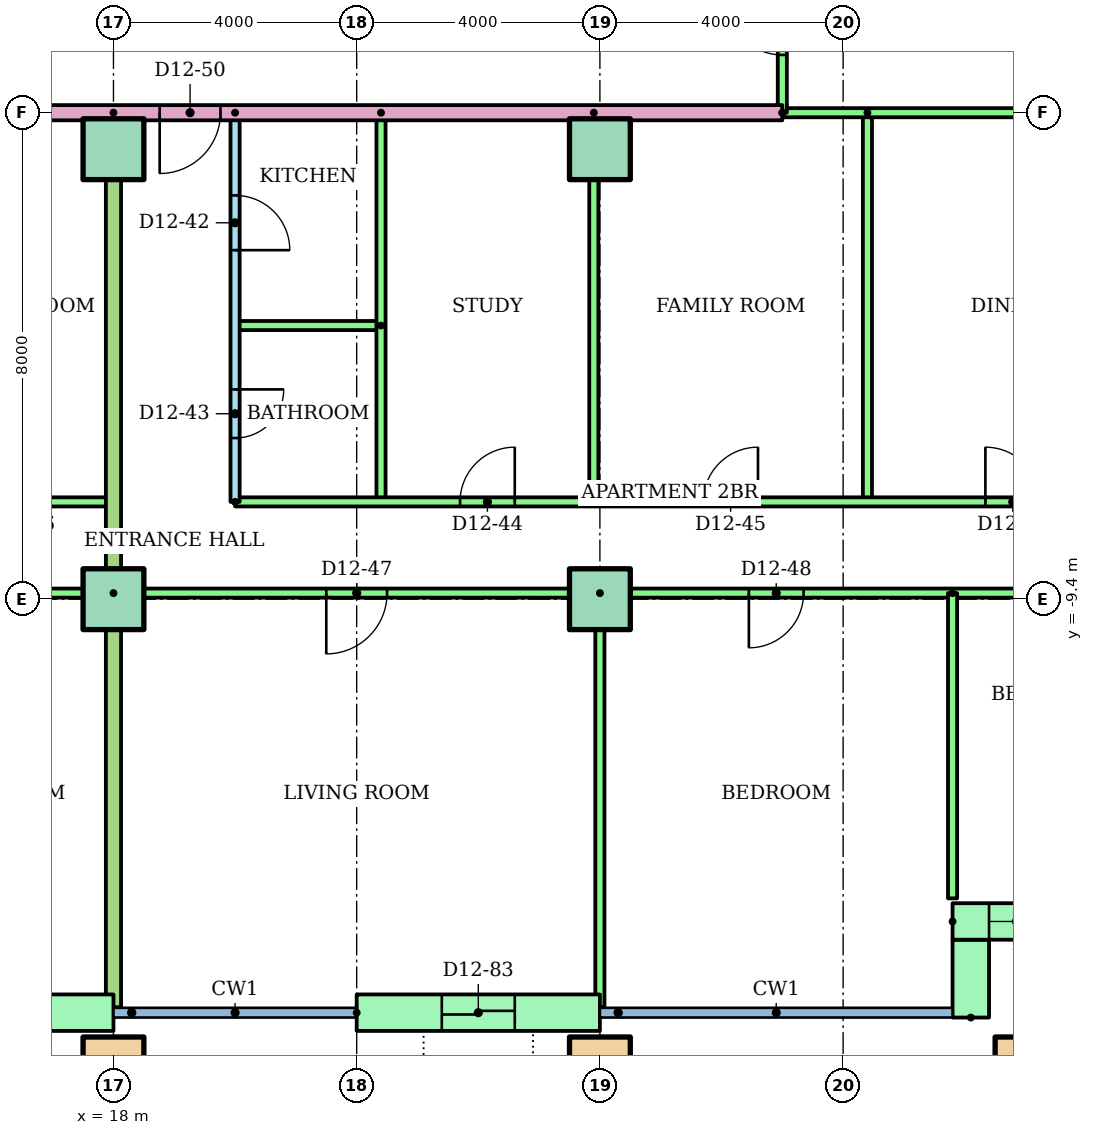
"""IFC4 building model, lengths in metres.
Left out: names, types, materials, properties, quantities, classifications, styles, units other than length and angle.
Written with IfcOpenShell. Run it as: python <this file> out.ifc"""

import sys

from ifc_helpers import new_model, si_unit, direction, frame, frame_2d, origin, origin_2d, place, context, subcontext, project, spatial, rectangle, hollow_rectangle, extrude, element, fill, save


model = new_model("IFC4")
c1 = context("Model", 3, precision=1e-05, world=origin(), true_north=direction((0.0, 1.0)))
c2 = subcontext(c1, "Body", "Model", "MODEL_VIEW")
j1 = project(units=[si_unit("LENGTHUNIT", "METRE"), si_unit("PLANEANGLEUNIT", "RADIAN")], contexts=[c1])
p1 = place(None, origin())
s1 = spatial("IfcSite", under=j1, at=p1, CompositionType="ELEMENT")
p2 = place(p1, origin())
s2 = spatial("IfcBuilding", under=s1, at=p2, CompositionType="ELEMENT")
p3 = place(p2, frame((0.0, 0.0, 48.0)))
s3 = spatial("IfcBuildingStorey", under=s2, at=p3, CompositionType="ELEMENT", Elevation=48.0)
for number, where in (
    (1, (18.0, -17.1, 0.0)),
    (2, (26.0, -17.1, 0.0)),
    (3, (33.0, -17.1, 0.0)),
):
    element("IfcColumn", number, at=place(p3, frame(where)), inside=s3, PredefinedType="COLUMN", context=c2, shape_type="SweptSolid", body=[
        extrude(hollow_rectangle(XDim=1.0, YDim=1.0, WallThickness=0.05, at=origin_2d()), origin(), (0.0, 0.0, 1.0), 3.2),
    ])
for number, where in (
    (4, (18.0, -9.4, 0.0)),
    (5, (26.0, -9.4, 0.0)),
    (6, (18.0, -2.0, 0.0)),
    (7, (26.0, -2.0, 0.0)),
):
    element("IfcColumn", number, at=place(p3, frame(where)), inside=s3, PredefinedType="COLUMN", context=c2, shape_type="SweptSolid", body=[
        extrude(rectangle(XDim=1.0, YDim=1.0, at=origin_2d()), origin(), (0.0, 0.0, 1.0), 3.2),
    ])
p4 = place(p3, frame((14.0, -16.2, 0.0)))
e8 = element("IfcWall", 8, at=p4, inside=s3, PredefinedType="STANDARD", context=c2, shape_type="SweptSolid", body=[
    extrude(rectangle(XDim=4.0, YDim=0.6, at=frame_2d((2.0, 0.0))), origin(), (0.0, 0.0, 1.0), 2.92),
])
p5 = place(p4, frame((1.4, 0.0, 0.0)))
e9 = element("IfcOpeningElement", 9, at=p5, cuts=e8, PredefinedType="OPENING", context=c2, shape_type="SweptSolid", body=[
    extrude(rectangle(XDim=1.2, YDim=2.1, at=frame_2d((0.6, 1.05))), frame((0.0, 0.31, 0.0), z_axis=(0.0, -1.0, 0.0), x_axis=(1.0, 0.0, 0.0)), (0.0, 0.0, 1.0), 0.62),
])
p6 = place(p3, frame((22.0, -16.2, 0.0)))
e10 = element("IfcWall", 10, at=p6, inside=s3, PredefinedType="STANDARD", context=c2, shape_type="SweptSolid", body=[
    extrude(rectangle(XDim=4.0, YDim=0.6, at=frame_2d((2.0, 0.0))), origin(), (0.0, 0.0, 1.0), 2.92),
])
p7 = place(p6, frame((1.4, 0.0, 0.0)))
e11 = element("IfcOpeningElement", 11, at=p7, cuts=e10, PredefinedType="OPENING", context=c2, shape_type="SweptSolid", body=[
    extrude(rectangle(XDim=1.2, YDim=2.1, at=frame_2d((0.6, 1.05))), frame((0.0, 0.31, 0.0), z_axis=(0.0, -1.0, 0.0), x_axis=(1.0, 0.0, 0.0)), (0.0, 0.0, 1.0), 0.62),
])
p8 = place(p3, frame((32.1, -16.28, 0.0), z_axis=(0.0, 0.0, 1.0), x_axis=(0.0, 1.0, 0.0)))
e12 = element("IfcWall", 12, at=p8, inside=s3, PredefinedType="STANDARD", context=c2, shape_type="SweptSolid", body=[
    extrude(rectangle(XDim=1.28, YDim=0.6, at=frame_2d((0.64, 0.0))), origin(), (0.0, 0.0, 1.0), 2.92),
])
p9 = place(p3, frame((31.8, -14.7, 0.0)))
e13 = element("IfcWall", 13, at=p9, inside=s3, PredefinedType="STANDARD", context=c2, shape_type="SweptSolid", body=[
    extrude(rectangle(XDim=2.1, YDim=0.6, at=frame_2d((1.05, 0.0))), origin(), (0.0, 0.0, 1.0), 2.92),
])
p10 = place(p9, frame((0.6, 0.0, 0.9)))
e14 = element("IfcOpeningElement", 14, at=p10, cuts=e13, PredefinedType="OPENING", context=c2, shape_type="SweptSolid", body=[
    extrude(rectangle(XDim=0.9, YDim=1.5, at=frame_2d((0.45, 0.75))), frame((0.0, 0.31, 0.0), z_axis=(0.0, -1.0, 0.0), x_axis=(1.0, 0.0, 0.0)), (0.0, 0.0, 1.0), 0.62),
])
p11 = place(p3, frame((4.0, -7.8, 0.0)))
e15 = element("IfcWall", 15, at=p11, inside=s3, PredefinedType="PARTITIONING", context=c2, shape_type="SweptSolid", body=[
    extrude(rectangle(XDim=14.0, YDim=0.15, at=frame_2d((7.0, 0.0))), origin(), (0.0, 0.0, 1.0), 2.4),
])
p12 = place(p11, frame((4.325, 0.0, 0.0)))
e16 = element("IfcOpeningElement", 16, at=p12, cuts=e15, PredefinedType="OPENING", context=c2, shape_type="SweptSolid", body=[
    extrude(rectangle(XDim=0.9, YDim=2.1, at=frame_2d((0.45, 1.05))), frame((0.0, 0.085, 0.0), z_axis=(0.0, -1.0, 0.0), x_axis=(1.0, 0.0, 0.0)), (0.0, 0.0, 1.0), 0.17),
])
p13 = place(p11, frame((8.575, 0.0, 0.0)))
e17 = element("IfcOpeningElement", 17, at=p13, cuts=e15, PredefinedType="OPENING", context=c2, shape_type="SweptSolid", body=[
    extrude(rectangle(XDim=0.9, YDim=2.1, at=frame_2d((0.45, 1.05))), frame((0.0, 0.085, 0.0), z_axis=(0.0, -1.0, 0.0), x_axis=(1.0, 0.0, 0.0)), (0.0, 0.0, 1.0), 0.17),
])
p14 = place(p11, frame((12.0, 0.0, 0.0)))
e18 = element("IfcOpeningElement", 18, at=p14, cuts=e15, PredefinedType="OPENING", context=c2, shape_type="SweptSolid", body=[
    extrude(rectangle(XDim=0.9, YDim=2.1, at=frame_2d((0.45, 1.05))), frame((0.0, 0.085, 0.0), z_axis=(0.0, -1.0, 0.0), x_axis=(1.0, 0.0, 0.0)), (0.0, 0.0, 1.0), 0.17),
])
p15 = place(p3, frame((18.0, -9.3, 0.0), z_axis=(0.0, 0.0, 1.0), x_axis=(-1.0, 0.0, 0.0)))
e19 = element("IfcWall", 19, at=p15, inside=s3, PredefinedType="PARTITIONING", context=c2, shape_type="SweptSolid", body=[
    extrude(rectangle(XDim=16.0, YDim=0.15, at=frame_2d((8.0, 0.0))), origin(), (0.0, 0.0, 1.0), 2.4),
])
p16 = place(p15, frame((13.55, 0.0, 0.0)))
e20 = element("IfcOpeningElement", 20, at=p16, cuts=e19, PredefinedType="OPENING", context=c2, shape_type="SweptSolid", body=[
    extrude(rectangle(XDim=0.9, YDim=2.1, at=frame_2d((0.45, 1.05))), frame((0.0, 0.085, 0.0), z_axis=(0.0, -1.0, 0.0), x_axis=(1.0, 0.0, 0.0)), (0.0, 0.0, 1.0), 0.17),
])
p17 = place(p15, frame((9.55, 0.0, 0.0)))
e21 = element("IfcOpeningElement", 21, at=p17, cuts=e19, PredefinedType="OPENING", context=c2, shape_type="SweptSolid", body=[
    extrude(rectangle(XDim=0.9, YDim=2.1, at=frame_2d((0.45, 1.05))), frame((0.0, 0.085, 0.0), z_axis=(0.0, -1.0, 0.0), x_axis=(1.0, 0.0, 0.0)), (0.0, 0.0, 1.0), 0.17),
])
p18 = place(p15, frame((5.55, 0.0, 0.0)))
e22 = element("IfcOpeningElement", 22, at=p18, cuts=e19, PredefinedType="OPENING", context=c2, shape_type="SweptSolid", body=[
    extrude(rectangle(XDim=0.9, YDim=2.1, at=frame_2d((0.45, 1.05))), frame((0.0, 0.085, 0.0), z_axis=(0.0, -1.0, 0.0), x_axis=(1.0, 0.0, 0.0)), (0.0, 0.0, 1.0), 0.17),
])
p19 = place(p15, frame((1.5, 0.0, 0.0)))
e23 = element("IfcOpeningElement", 23, at=p19, cuts=e19, PredefinedType="OPENING", context=c2, shape_type="SweptSolid", body=[
    extrude(rectangle(XDim=1.0, YDim=2.1, at=frame_2d((0.5, 1.05))), frame((0.0, 0.085, 0.0), z_axis=(0.0, -1.0, 0.0), x_axis=(1.0, 0.0, 0.0)), (0.0, 0.0, 1.0), 0.17),
])
p20 = place(p3, frame((20.0, -1.4, 0.0), z_axis=(0.0, 0.0, 1.0), x_axis=(0.0, -1.0, 0.0)))
e24 = element("IfcWall", 24, at=p20, inside=s3, PredefinedType="PARTITIONING", context=c2, shape_type="SweptSolid", body=[
    extrude(rectangle(XDim=6.4, YDim=0.15, at=frame_2d((3.2, 0.0))), origin(), (0.0, 0.0, 1.0), 2.4),
])
p21 = place(p20, frame((1.36, 0.0, 0.0)))
e25 = element("IfcOpeningElement", 25, at=p21, cuts=e24, PredefinedType="OPENING", context=c2, shape_type="SweptSolid", body=[
    extrude(rectangle(XDim=0.9, YDim=2.1, at=frame_2d((0.45, 1.05))), frame((0.0, 0.085, 0.0), z_axis=(0.0, -1.0, 0.0), x_axis=(1.0, 0.0, 0.0)), (0.0, 0.0, 1.0), 0.17),
])
p22 = place(p20, frame((4.55, 0.0, 0.0)))
e26 = element("IfcOpeningElement", 26, at=p22, cuts=e24, PredefinedType="OPENING", context=c2, shape_type="SweptSolid", body=[
    extrude(rectangle(XDim=0.8, YDim=2.1, at=frame_2d((0.4, 1.05))), frame((0.0, 0.085, 0.0), z_axis=(0.0, -1.0, 0.0), x_axis=(1.0, 0.0, 0.0)), (0.0, 0.0, 1.0), 0.17),
])
p23 = place(p3, frame((22.4, -4.9, 0.0), z_axis=(0.0, 0.0, 1.0), x_axis=(-1.0, 0.0, 0.0)))
e27 = element("IfcWall", 27, at=p23, inside=s3, PredefinedType="PARTITIONING", context=c2, shape_type="SweptSolid", body=[
    extrude(rectangle(XDim=2.4, YDim=0.15, at=frame_2d((1.2, 0.0))), origin(), (0.0, 0.0, 1.0), 2.4),
])
for number, where, z_axis, x_axis in (
    (28, (22.4, -1.4, 0.0), (0.0, 0.0, 1.0), (0.0, -1.0, 0.0)),
    (29, (25.9, -1.4, 0.0), (0.0, 0.0, 1.0), (0.0, -1.0, 0.0)),
    (30, (30.4, -1.4, 0.0), (0.0, 0.0, 1.0), (0.0, -1.0, 0.0)),
):
    element("IfcWall", number, at=place(p3, frame(where, z_axis=z_axis, x_axis=x_axis)), inside=s3, PredefinedType="PARTITIONING", context=c2, shape_type="SweptSolid", body=[
        extrude(rectangle(XDim=6.4, YDim=0.15, at=frame_2d((3.2, 0.0))), origin(), (0.0, 0.0, 1.0), 2.4),
    ])
p24 = place(p3, frame((20.0, -7.8, 0.0)))
e31 = element("IfcWall", 31, at=p24, inside=s3, PredefinedType="PARTITIONING", context=c2, shape_type="SweptSolid", body=[
    extrude(rectangle(XDim=16.52, YDim=0.15, at=frame_2d((8.26, 0.0))), origin(), (0.0, 0.0, 1.0), 2.4),
])
p25 = place(p24, frame((3.7, 0.0, 0.0)))
e32 = element("IfcOpeningElement", 32, at=p25, cuts=e31, PredefinedType="OPENING", context=c2, shape_type="SweptSolid", body=[
    extrude(rectangle(XDim=0.9, YDim=2.1, at=frame_2d((0.45, 1.05))), frame((0.0, 0.085, 0.0), z_axis=(0.0, -1.0, 0.0), x_axis=(1.0, 0.0, 0.0)), (0.0, 0.0, 1.0), 0.17),
])
p26 = place(p24, frame((7.7, 0.0, 0.0)))
e33 = element("IfcOpeningElement", 33, at=p26, cuts=e31, PredefinedType="OPENING", context=c2, shape_type="SweptSolid", body=[
    extrude(rectangle(XDim=0.9, YDim=2.1, at=frame_2d((0.45, 1.05))), frame((0.0, 0.085, 0.0), z_axis=(0.0, -1.0, 0.0), x_axis=(1.0, 0.0, 0.0)), (0.0, 0.0, 1.0), 0.17),
])
p27 = place(p24, frame((12.34, 0.0, 0.0)))
e34 = element("IfcOpeningElement", 34, at=p27, cuts=e31, PredefinedType="OPENING", context=c2, shape_type="SweptSolid", body=[
    extrude(rectangle(XDim=0.9, YDim=2.1, at=frame_2d((0.45, 1.05))), frame((0.0, 0.085, 0.0), z_axis=(0.0, -1.0, 0.0), x_axis=(1.0, 0.0, 0.0)), (0.0, 0.0, 1.0), 0.17),
])
p28 = place(p3, frame((36.52, -9.3, 0.0), z_axis=(0.0, 0.0, 1.0), x_axis=(-1.0, 0.0, 0.0)))
e35 = element("IfcWall", 35, at=p28, inside=s3, PredefinedType="PARTITIONING", context=c2, shape_type="SweptSolid", body=[
    extrude(rectangle(XDim=18.52, YDim=0.15, at=frame_2d((9.26, 0.0))), origin(), (0.0, 0.0, 1.0), 2.4),
])
p29 = place(p28, frame((14.02, 0.0, 0.0)))
e36 = element("IfcOpeningElement", 36, at=p29, cuts=e35, PredefinedType="OPENING", context=c2, shape_type="SweptSolid", body=[
    extrude(rectangle(XDim=1.0, YDim=2.1, at=frame_2d((0.5, 1.05))), frame((0.0, 0.085, 0.0), z_axis=(0.0, -1.0, 0.0), x_axis=(1.0, 0.0, 0.0)), (0.0, 0.0, 1.0), 0.17),
])
p30 = place(p28, frame((7.17, 0.0, 0.0)))
e37 = element("IfcOpeningElement", 37, at=p30, cuts=e35, PredefinedType="OPENING", context=c2, shape_type="SweptSolid", body=[
    extrude(rectangle(XDim=0.9, YDim=2.1, at=frame_2d((0.45, 1.05))), frame((0.0, 0.085, 0.0), z_axis=(0.0, -1.0, 0.0), x_axis=(1.0, 0.0, 0.0)), (0.0, 0.0, 1.0), 0.17),
])
p31 = place(p28, frame((0.86, 0.0, 0.0)))
e38 = element("IfcOpeningElement", 38, at=p31, cuts=e35, PredefinedType="OPENING", context=c2, shape_type="SweptSolid", body=[
    extrude(rectangle(XDim=0.9, YDim=2.1, at=frame_2d((0.45, 1.05))), frame((0.0, 0.085, 0.0), z_axis=(0.0, -1.0, 0.0), x_axis=(1.0, 0.0, 0.0)), (0.0, 0.0, 1.0), 0.17),
])
p32 = place(p3, frame((26.0, -9.3, 0.0), z_axis=(0.0, 0.0, 1.0), x_axis=(0.0, -1.0, 0.0)))
e39 = element("IfcWall", 39, at=p32, inside=s3, PredefinedType="PARTITIONING", context=c2, shape_type="SweptSolid", body=[
    extrude(rectangle(XDim=6.81, YDim=0.15, at=frame_2d((3.405, 0.0))), origin(), (0.0, 0.0, 1.0), 2.4),
])
p33 = place(p3, frame((31.8, -9.3, 0.0), z_axis=(0.0, 0.0, 1.0), x_axis=(0.0, -1.0, 0.0)))
e40 = element("IfcWall", 40, at=p33, inside=s3, PredefinedType="PARTITIONING", context=c2, shape_type="SweptSolid", body=[
    extrude(rectangle(XDim=5.02, YDim=0.15, at=frame_2d((2.51, 0.0))), origin(), (0.0, 0.0, 1.0), 2.4),
])
p34 = place(p3, frame((18.0, -1.4, 0.0), z_axis=(0.0, 0.0, 1.0), x_axis=(0.0, -1.0, 0.0)))
e41 = element("IfcWall", 41, at=p34, inside=s3, PredefinedType="PARTITIONING", context=c2, shape_type="SweptSolid", body=[
    extrude(rectangle(XDim=14.71, YDim=0.25, at=frame_2d((7.355, 0.0))), origin(), (0.0, 0.0, 1.0), 2.4),
])
p35 = place(p3, frame((29.0, -1.4, 0.0), z_axis=(0.0, 0.0, 1.0), x_axis=(-1.0, 0.0, 0.0)))
e42 = element("IfcWall", 42, at=p35, inside=s3, PredefinedType="PARTITIONING", context=c2, shape_type="SweptSolid", body=[
    extrude(rectangle(XDim=15.0, YDim=0.25, at=frame_2d((7.5, 0.0))), origin(), (0.0, 0.0, 1.0), 2.4),
])
p36 = place(p35, frame((9.24, 0.0, 0.0)))
e43 = element("IfcOpeningElement", 43, at=p36, cuts=e42, PredefinedType="OPENING", context=c2, shape_type="SweptSolid", body=[
    extrude(rectangle(XDim=1.0, YDim=2.1, at=frame_2d((0.5, 1.05))), frame((0.0, 0.135, 0.0), z_axis=(0.0, -1.0, 0.0), x_axis=(1.0, 0.0, 0.0)), (0.0, 0.0, 1.0), 0.27),
])
p37 = place(p3, frame((36.52, -1.4, 0.0), z_axis=(0.0, 0.0, 1.0), x_axis=(-1.0, 0.0, 0.0)))
e44 = element("IfcWall", 44, at=p37, inside=s3, PredefinedType="PARTITIONING", context=c2, shape_type="SweptSolid", body=[
    extrude(rectangle(XDim=7.52, YDim=0.15, at=frame_2d((3.76, 0.0))), origin(), (0.0, 0.0, 1.0), 2.4),
])
p38 = place(p3, frame((29.0, -1.4, 0.0), z_axis=(0.0, 0.0, 1.0), x_axis=(0.0, 1.0, 0.0)))
e45 = element("IfcWall", 45, at=p38, inside=s3, PredefinedType="PARTITIONING", context=c2, shape_type="SweptSolid", body=[
    extrude(rectangle(XDim=2.8, YDim=0.15, at=frame_2d((1.4, 0.0))), origin(), (0.0, 0.0, 1.0), 2.4),
])
p39 = place(p38, frame((0.95, 0.0, 0.0)))
e46 = element("IfcOpeningElement", 46, at=p39, cuts=e45, PredefinedType="OPENING", context=c2, shape_type="SweptSolid", body=[
    extrude(rectangle(XDim=0.9, YDim=2.1, at=frame_2d((0.45, 1.05))), frame((0.0, 0.085, 0.0), z_axis=(0.0, -1.0, 0.0), x_axis=(1.0, 0.0, 0.0)), (0.0, 0.0, 1.0), 0.17),
])
p40 = place(p10, origin())
e47 = element("IfcWindow", 47, at=p40, inside=s3, PartitioningType="SINGLE_PANEL", PredefinedType="WINDOW", context=c2, shape_type="SweptSolid", body=[
    extrude(rectangle(XDim=0.9, YDim=1.5, at=frame_2d((0.45, 0.75))), frame((0.0, 0.03, 0.0), z_axis=(0.0, -1.0, 0.0), x_axis=(1.0, 0.0, 0.0)), (0.0, 0.0, 1.0), 0.06),
])
fill(e14, e47)
p41 = place(p21, origin())
e48 = element("IfcDoor", 48, at=p41, inside=s3, OperationType="SINGLE_SWING_RIGHT", PredefinedType="DOOR", context=c2, shape_type="SweptSolid", body=[
    extrude(rectangle(XDim=0.9, YDim=2.1, at=frame_2d((0.45, 1.05))), frame((0.0, 0.025, 0.0), z_axis=(0.0, -1.0, 0.0), x_axis=(1.0, 0.0, 0.0)), (0.0, 0.0, 1.0), 0.05),
])
fill(e25, e48)
p42 = place(p22, origin())
e49 = element("IfcDoor", 49, at=p42, inside=s3, OperationType="SINGLE_SWING_LEFT", PredefinedType="DOOR", context=c2, shape_type="SweptSolid", body=[
    extrude(rectangle(XDim=0.8, YDim=2.1, at=frame_2d((0.4, 1.05))), frame((0.0, 0.025, 0.0), z_axis=(0.0, -1.0, 0.0), x_axis=(1.0, 0.0, 0.0)), (0.0, 0.0, 1.0), 0.05),
])
fill(e26, e49)
p43 = place(p25, origin())
e50 = element("IfcDoor", 50, at=p43, inside=s3, OperationType="SINGLE_SWING_RIGHT", PredefinedType="DOOR", context=c2, shape_type="SweptSolid", body=[
    extrude(rectangle(XDim=0.9, YDim=2.1, at=frame_2d((0.45, 1.05))), frame((0.0, 0.025, 0.0), z_axis=(0.0, -1.0, 0.0), x_axis=(1.0, 0.0, 0.0)), (0.0, 0.0, 1.0), 0.05),
])
fill(e32, e50)
p44 = place(p26, origin())
e51 = element("IfcDoor", 51, at=p44, inside=s3, OperationType="SINGLE_SWING_RIGHT", PredefinedType="DOOR", context=c2, shape_type="SweptSolid", body=[
    extrude(rectangle(XDim=0.9, YDim=2.1, at=frame_2d((0.45, 1.05))), frame((0.0, 0.025, 0.0), z_axis=(0.0, -1.0, 0.0), x_axis=(1.0, 0.0, 0.0)), (0.0, 0.0, 1.0), 0.05),
])
fill(e33, e51)
p45 = place(p27, origin())
e52 = element("IfcDoor", 52, at=p45, inside=s3, OperationType="SINGLE_SWING_LEFT", PredefinedType="DOOR", context=c2, shape_type="SweptSolid", body=[
    extrude(rectangle(XDim=0.9, YDim=2.1, at=frame_2d((0.45, 1.05))), frame((0.0, 0.025, 0.0), z_axis=(0.0, -1.0, 0.0), x_axis=(1.0, 0.0, 0.0)), (0.0, 0.0, 1.0), 0.05),
])
fill(e34, e52)
p46 = place(p29, origin())
e53 = element("IfcDoor", 53, at=p46, inside=s3, OperationType="SINGLE_SWING_RIGHT", PredefinedType="DOOR", context=c2, shape_type="SweptSolid", body=[
    extrude(rectangle(XDim=1.0, YDim=2.1, at=frame_2d((0.5, 1.05))), frame((0.0, 0.025, 0.0), z_axis=(0.0, -1.0, 0.0), x_axis=(1.0, 0.0, 0.0)), (0.0, 0.0, 1.0), 0.05),
])
fill(e36, e53)
p47 = place(p30, origin())
e54 = element("IfcDoor", 54, at=p47, inside=s3, OperationType="SINGLE_SWING_RIGHT", PredefinedType="DOOR", context=c2, shape_type="SweptSolid", body=[
    extrude(rectangle(XDim=0.9, YDim=2.1, at=frame_2d((0.45, 1.05))), frame((0.0, 0.025, 0.0), z_axis=(0.0, -1.0, 0.0), x_axis=(1.0, 0.0, 0.0)), (0.0, 0.0, 1.0), 0.05),
])
fill(e37, e54)
p48 = place(p36, origin())
e55 = element("IfcDoor", 55, at=p48, inside=s3, OperationType="SINGLE_SWING_RIGHT", PredefinedType="DOOR", context=c2, shape_type="SweptSolid", body=[
    extrude(rectangle(XDim=1.0, YDim=2.1, at=frame_2d((0.5, 1.05))), frame((0.0, 0.025, 0.0), z_axis=(0.0, -1.0, 0.0), x_axis=(1.0, 0.0, 0.0)), (0.0, 0.0, 1.0), 0.05),
])
fill(e43, e55)
p49 = place(p39, origin())
e56 = element("IfcDoor", 56, at=p49, inside=s3, OperationType="SINGLE_SWING_RIGHT", PredefinedType="DOOR", context=c2, shape_type="SweptSolid", body=[
    extrude(rectangle(XDim=0.9, YDim=2.1, at=frame_2d((0.45, 1.05))), frame((0.0, 0.025, 0.0), z_axis=(0.0, -1.0, 0.0), x_axis=(1.0, 0.0, 0.0)), (0.0, 0.0, 1.0), 0.05),
])
fill(e46, e56)
p50 = place(p7, origin())
e57 = element("IfcDoor", 57, at=p50, inside=s3, OperationType="SLIDING_TO_LEFT", PredefinedType="DOOR", context=c2, shape_type="SweptSolid", body=[
    extrude(rectangle(XDim=1.2, YDim=2.1, at=frame_2d((0.6, 1.05))), frame((0.0, 0.025, 0.0), z_axis=(0.0, -1.0, 0.0), x_axis=(1.0, 0.0, 0.0)), (0.0, 0.0, 1.0), 0.05),
])
fill(e11, e57)
save(model, sys.argv[1])
